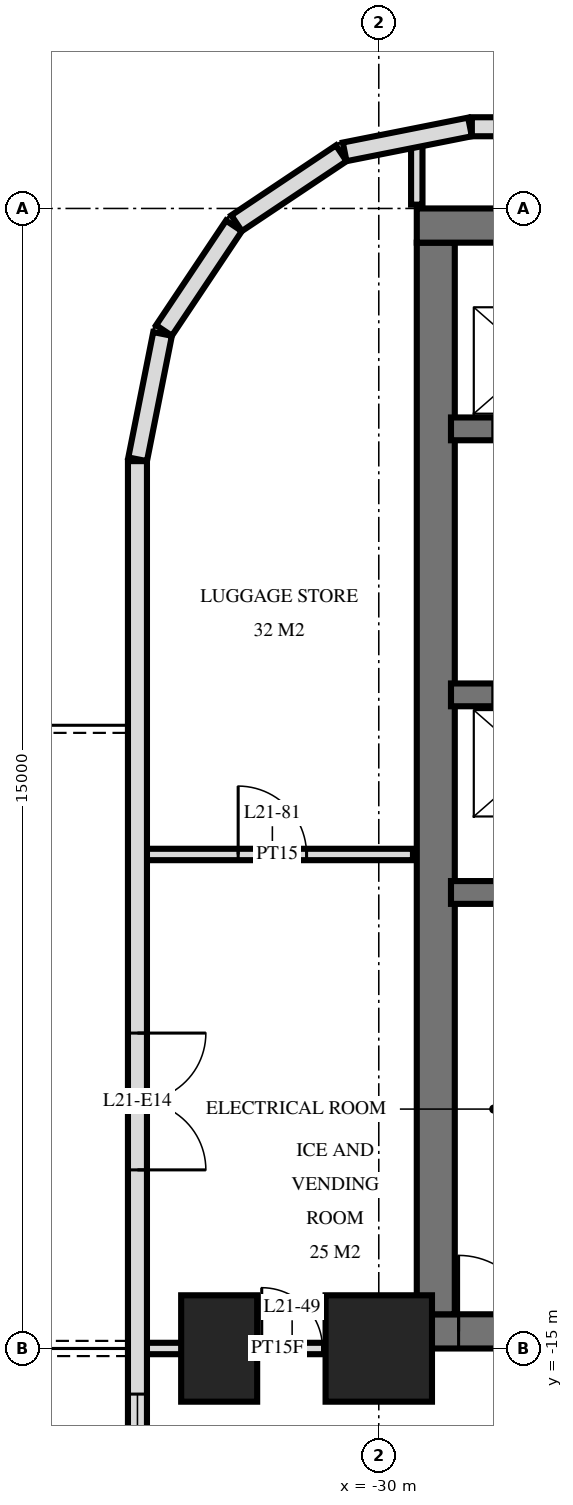
"""IFC4 building model, lengths in metres.
Left out: names, types, materials, properties, quantities, classifications, styles, units other than length and angle.
Written with IfcOpenShell. Run it as: python <this file> out.ifc"""

import sys

from ifc_helpers import new_model, si_unit, direction, frame, frame_2d, origin, origin_2d, place, context, subcontext, project, spatial, rectangle, extrude, element, fill, save


model = new_model("IFC4")
c1 = context("Model", 3, precision=1e-05, world=origin(), true_north=direction((0.0, 1.0)))
c2 = subcontext(c1, "Body", "Model", "MODEL_VIEW")
j1 = project(units=[si_unit("LENGTHUNIT", "METRE"), si_unit("PLANEANGLEUNIT", "RADIAN")], contexts=[c1])
p1 = place(None, origin())
s1 = spatial("IfcSite", under=j1, at=p1, CompositionType="ELEMENT")
p2 = place(p1, origin())
s2 = spatial("IfcBuilding", under=s1, at=p2, CompositionType="ELEMENT")
p3 = place(p2, frame((0.0, 0.0, 85.2)))
s3 = spatial("IfcBuildingStorey", under=s2, at=p3, CompositionType="ELEMENT", Elevation=85.2)
p4 = place(p3, frame((-32.1, -15.0, 0.0), z_axis=(0.0, 0.0, 1.0), x_axis=(0.0, 1.0, 0.0)))
e1 = element("IfcColumn", 1, at=p4, inside=s3, PredefinedType="COLUMN", context=c2, shape_type="SweptSolid", body=[
    extrude(rectangle(XDim=1.4, YDim=1.0, at=origin_2d()), origin(), (0.0, 0.0, 1.0), 3.6),
])
p5 = place(p3, frame((-30.0, -15.0, 0.0), z_axis=(0.0, 0.0, 1.0), x_axis=(1.0, 0.0, 0.0)))
e2 = element("IfcColumn", 2, at=p5, inside=s3, PredefinedType="COLUMN", context=c2, shape_type="SweptSolid", body=[
    extrude(rectangle(XDim=1.4, YDim=1.4, at=origin_2d()), origin(), (0.0, 0.0, 1.0), 3.6),
])
p6 = place(p3, frame((-29.5, -0.225, 0.0), z_axis=(0.0, 0.0, 1.0), x_axis=(1.0, 0.0, 0.0)))
e3 = element("IfcWall", 3, at=p6, inside=s3, PredefinedType="SHEAR", context=c2, shape_type="SweptSolid", body=[
    extrude(rectangle(XDim=19.5, YDim=0.45, at=frame_2d((9.75, 0.0))), origin(), (0.0, 0.0, 1.0), 3.6),
])
p7 = place(p3, frame((-29.5, -14.775, 0.0), z_axis=(0.0, 0.0, 1.0), x_axis=(1.0, 0.0, 0.0)))
e4 = element("IfcWall", 4, at=p7, inside=s3, PredefinedType="SHEAR", context=c2, shape_type="SweptSolid", body=[
    extrude(rectangle(XDim=19.5, YDim=0.45, at=frame_2d((9.75, 0.0))), origin(), (0.0, 0.0, 1.0), 3.6),
])
p8 = place(p7, frame((11.2, 0.0, 0.0)))
e5 = element("IfcOpeningElement", 5, at=p8, cuts=e4, PredefinedType="OPENING", context=c2, shape_type="SweptSolid", body=[
    extrude(rectangle(XDim=1.2, YDim=2.1, at=frame_2d((0.6, 1.05))), frame((0.0, 0.235, 0.0), z_axis=(0.0, -1.0, 0.0), x_axis=(1.0, 0.0, 0.0)), (0.0, 0.0, 1.0), 0.47),
])
p9 = place(p7, frame((14.25, 0.0, 0.0)))
e6 = element("IfcOpeningElement", 6, at=p9, cuts=e4, PredefinedType="OPENING", context=c2, shape_type="SweptSolid", body=[
    extrude(rectangle(XDim=1.1, YDim=2.1, at=frame_2d((0.55, 1.05))), frame((0.0, 0.235, 0.0), z_axis=(0.0, -1.0, 0.0), x_axis=(1.0, 0.0, 0.0)), (0.0, 0.0, 1.0), 0.47),
])
p10 = place(p7, frame((8.5, 0.0, 0.0)))
e7 = element("IfcOpeningElement", 7, at=p10, cuts=e4, PredefinedType="OPENING", context=c2, shape_type="SweptSolid", body=[
    extrude(rectangle(XDim=0.9, YDim=2.1, at=frame_2d((0.45, 1.05))), frame((0.0, 0.235, 0.0), z_axis=(0.0, -1.0, 0.0), x_axis=(1.0, 0.0, 0.0)), (0.0, 0.0, 1.0), 0.47),
])
p11 = place(p7, frame((6.05, 0.0, 0.0)))
e8 = element("IfcOpeningElement", 8, at=p11, cuts=e4, PredefinedType="OPENING", context=c2, shape_type="SweptSolid", body=[
    extrude(rectangle(XDim=1.0, YDim=2.1, at=frame_2d((0.5, 1.05))), frame((0.0, 0.235, 0.0), z_axis=(0.0, -1.0, 0.0), x_axis=(1.0, 0.0, 0.0)), (0.0, 0.0, 1.0), 0.47),
])
p12 = place(p7, frame((3.587, 0.0, 0.0)))
e9 = element("IfcOpeningElement", 9, at=p12, cuts=e4, PredefinedType="OPENING", context=c2, shape_type="SweptSolid", body=[
    extrude(rectangle(XDim=1.0, YDim=2.1, at=frame_2d((0.5, 1.05))), frame((0.0, 0.235, 0.0), z_axis=(0.0, -1.0, 0.0), x_axis=(1.0, 0.0, 0.0)), (0.0, 0.0, 1.0), 0.47),
])
p13 = place(p7, frame((1.85, 0.0, 0.0)))
e10 = element("IfcOpeningElement", 10, at=p13, cuts=e4, PredefinedType="OPENING", context=c2, shape_type="SweptSolid", body=[
    extrude(rectangle(XDim=1.0, YDim=2.1, at=frame_2d((0.5, 1.05))), frame((0.0, 0.235, 0.0), z_axis=(0.0, -1.0, 0.0), x_axis=(1.0, 0.0, 0.0)), (0.0, 0.0, 1.0), 0.47),
])
p14 = place(p7, frame((0.55, 0.0, 0.0)))
e11 = element("IfcOpeningElement", 11, at=p14, cuts=e4, PredefinedType="OPENING", context=c2, shape_type="SweptSolid", body=[
    extrude(rectangle(XDim=1.0, YDim=2.1, at=frame_2d((0.5, 1.05))), frame((0.0, 0.235, 0.0), z_axis=(0.0, -1.0, 0.0), x_axis=(1.0, 0.0, 0.0)), (0.0, 0.0, 1.0), 0.47),
])
p15 = place(p3, frame((-29.25, -14.55, 0.0), z_axis=(0.0, 0.0, 1.0), x_axis=(0.0, 1.0, 0.0)))
e12 = element("IfcWall", 12, at=p15, inside=s3, PredefinedType="SHEAR", context=c2, shape_type="SweptSolid", body=[
    extrude(rectangle(XDim=14.1, YDim=0.5, at=frame_2d((7.05, 0.0))), origin(), (0.0, 0.0, 1.0), 3.6),
])
p16 = place(p3, frame((-29.05, -2.9, 0.0), z_axis=(0.0, 0.0, 1.0), x_axis=(1.0, 0.0, 0.0)))
e13 = element("IfcWall", 13, at=p16, inside=s3, PredefinedType="SHEAR", context=c2, shape_type="SweptSolid", body=[
    extrude(rectangle(XDim=18.7, YDim=0.3, at=frame_2d((9.35, 0.0))), origin(), (0.0, 0.0, 1.0), 3.6),
])
p17 = place(p16, frame((2.95, 0.0, 0.0)))
e14 = element("IfcOpeningElement", 14, at=p17, cuts=e13, PredefinedType="OPENING", context=c2, shape_type="SweptSolid", body=[
    extrude(rectangle(XDim=1.1, YDim=2.1, at=frame_2d((0.55, 1.05))), frame((0.0, 0.16, 0.0), z_axis=(0.0, -1.0, 0.0), x_axis=(1.0, 0.0, 0.0)), (0.0, 0.0, 1.0), 0.32),
])
p18 = place(p16, frame((0.55, 0.0, 0.0)))
e15 = element("IfcOpeningElement", 15, at=p18, cuts=e13, PredefinedType="OPENING", context=c2, shape_type="SweptSolid", body=[
    extrude(rectangle(XDim=1.1, YDim=2.1, at=frame_2d((0.55, 1.05))), frame((0.0, 0.16, 0.0), z_axis=(0.0, -1.0, 0.0), x_axis=(1.0, 0.0, 0.0)), (0.0, 0.0, 1.0), 0.32),
])
p19 = place(p16, frame((10.9, 0.0, 0.0)))
e16 = element("IfcOpeningElement", 16, at=p19, cuts=e13, PredefinedType="OPENING", context=c2, shape_type="SweptSolid", body=[
    extrude(rectangle(XDim=0.9, YDim=2.1, at=frame_2d((0.45, 1.05))), frame((0.0, 0.16, 0.0), z_axis=(0.0, -1.0, 0.0), x_axis=(1.0, 0.0, 0.0)), (0.0, 0.0, 1.0), 0.32),
])
p20 = place(p16, frame((16.85, 0.0, 0.0)))
e17 = element("IfcOpeningElement", 17, at=p20, cuts=e13, PredefinedType="OPENING", context=c2, shape_type="SweptSolid", body=[
    extrude(rectangle(XDim=1.0, YDim=2.1, at=frame_2d((0.5, 1.05))), frame((0.0, 0.16, 0.0), z_axis=(0.0, -1.0, 0.0), x_axis=(1.0, 0.0, 0.0)), (0.0, 0.0, 1.0), 0.32),
])
p21 = place(p16, frame((14.312, 0.0, 0.0)))
e18 = element("IfcOpeningElement", 18, at=p21, cuts=e13, PredefinedType="OPENING", context=c2, shape_type="SweptSolid", body=[
    extrude(rectangle(XDim=1.0, YDim=2.1, at=frame_2d((0.5, 1.05))), frame((0.0, 0.16, 0.0), z_axis=(0.0, -1.0, 0.0), x_axis=(1.0, 0.0, 0.0)), (0.0, 0.0, 1.0), 0.32),
])
p22 = place(p16, frame((12.887, 0.0, 0.0)))
e19 = element("IfcOpeningElement", 19, at=p22, cuts=e13, PredefinedType="OPENING", context=c2, shape_type="SweptSolid", body=[
    extrude(rectangle(XDim=1.0, YDim=2.1, at=frame_2d((0.5, 1.05))), frame((0.0, 0.16, 0.0), z_axis=(0.0, -1.0, 0.0), x_axis=(1.0, 0.0, 0.0)), (0.0, 0.0, 1.0), 0.32),
])
p23 = place(p16, frame((5.6, 0.0, 0.0)))
e20 = element("IfcOpeningElement", 20, at=p23, cuts=e13, PredefinedType="OPENING", context=c2, shape_type="SweptSolid", body=[
    extrude(rectangle(XDim=1.0, YDim=2.1, at=frame_2d((0.5, 1.05))), frame((0.0, 0.16, 0.0), z_axis=(0.0, -1.0, 0.0), x_axis=(1.0, 0.0, 0.0)), (0.0, 0.0, 1.0), 0.32),
])
p24 = place(p3, frame((-29.05, -6.4, 0.0), z_axis=(0.0, 0.0, 1.0), x_axis=(1.0, 0.0, 0.0)))
e21 = element("IfcWall", 21, at=p24, inside=s3, PredefinedType="SHEAR", context=c2, shape_type="SweptSolid", body=[
    extrude(rectangle(XDim=18.7, YDim=0.3, at=frame_2d((9.35, 0.0))), origin(), (0.0, 0.0, 1.0), 3.6),
])
p25 = place(p24, frame((2.95, 0.0, 0.0)))
e22 = element("IfcOpeningElement", 22, at=p25, cuts=e21, PredefinedType="OPENING", context=c2, shape_type="SweptSolid", body=[
    extrude(rectangle(XDim=1.1, YDim=2.1, at=frame_2d((0.55, 1.05))), frame((0.0, 0.16, 0.0), z_axis=(0.0, -1.0, 0.0), x_axis=(1.0, 0.0, 0.0)), (0.0, 0.0, 1.0), 0.32),
])
p26 = place(p24, frame((0.55, 0.0, 0.0)))
e23 = element("IfcOpeningElement", 23, at=p26, cuts=e21, PredefinedType="OPENING", context=c2, shape_type="SweptSolid", body=[
    extrude(rectangle(XDim=1.1, YDim=2.1, at=frame_2d((0.55, 1.05))), frame((0.0, 0.16, 0.0), z_axis=(0.0, -1.0, 0.0), x_axis=(1.0, 0.0, 0.0)), (0.0, 0.0, 1.0), 0.32),
])
p27 = place(p24, frame((10.8, 0.0, 0.0)))
e24 = element("IfcOpeningElement", 24, at=p27, cuts=e21, PredefinedType="OPENING", context=c2, shape_type="SweptSolid", body=[
    extrude(rectangle(XDim=1.1, YDim=2.1, at=frame_2d((0.55, 1.05))), frame((0.0, 0.16, 0.0), z_axis=(0.0, -1.0, 0.0), x_axis=(1.0, 0.0, 0.0)), (0.0, 0.0, 1.0), 0.32),
])
p28 = place(p24, frame((5.6, 0.0, 0.0)))
e25 = element("IfcOpeningElement", 25, at=p28, cuts=e21, PredefinedType="OPENING", context=c2, shape_type="SweptSolid", body=[
    extrude(rectangle(XDim=1.0, YDim=2.1, at=frame_2d((0.5, 1.05))), frame((0.0, 0.16, 0.0), z_axis=(0.0, -1.0, 0.0), x_axis=(1.0, 0.0, 0.0)), (0.0, 0.0, 1.0), 0.32),
])
p29 = place(p3, frame((-29.05, -9.0, 0.0), z_axis=(0.0, 0.0, 1.0), x_axis=(1.0, 0.0, 0.0)))
e26 = element("IfcWall", 26, at=p29, inside=s3, PredefinedType="SHEAR", context=c2, shape_type="SweptSolid", body=[
    extrude(rectangle(XDim=18.7, YDim=0.3, at=frame_2d((9.35, 0.0))), origin(), (0.0, 0.0, 1.0), 3.6),
])
p30 = place(p29, frame((13.8, 0.0, 0.0)))
e27 = element("IfcOpeningElement", 27, at=p30, cuts=e26, PredefinedType="OPENING", context=c2, shape_type="SweptSolid", body=[
    extrude(rectangle(XDim=1.1, YDim=2.1, at=frame_2d((0.55, 1.05))), frame((0.0, 0.16, 0.0), z_axis=(0.0, -1.0, 0.0), x_axis=(1.0, 0.0, 0.0)), (0.0, 0.0, 1.0), 0.32),
])
p31 = place(p3, frame((28.775, 1.075, 0.0), z_axis=(0.0, 0.0, 1.0), x_axis=(-1.0, 0.0, 0.0)))
e28 = element("IfcWall", 28, at=p31, inside=s3, PredefinedType="SOLIDWALL", context=c2, shape_type="SweptSolid", body=[
    extrude(rectangle(XDim=57.551, YDim=0.25, at=frame_2d((28.775, 0.0))), origin(), (0.0, 0.0, 1.0), 3.32),
])
p32 = place(p31, frame((25.325, 0.0, 0.3)))
e29 = element("IfcOpeningElement", 29, at=p32, cuts=e28, PredefinedType="OPENING", context=c2, shape_type="SweptSolid", body=[
    extrude(rectangle(XDim=2.4, YDim=2.1, at=frame_2d((1.2, 1.05))), frame((0.0, 0.135, 0.0), z_axis=(0.0, -1.0, 0.0), x_axis=(1.0, 0.0, 0.0)), (0.0, 0.0, 1.0), 0.27),
])
p33 = place(p31, frame((30.275, 0.0, 0.3)))
e30 = element("IfcOpeningElement", 30, at=p33, cuts=e28, PredefinedType="OPENING", context=c2, shape_type="SweptSolid", body=[
    extrude(rectangle(XDim=2.4, YDim=2.1, at=frame_2d((1.2, 1.05))), frame((0.0, 0.135, 0.0), z_axis=(0.0, -1.0, 0.0), x_axis=(1.0, 0.0, 0.0)), (0.0, 0.0, 1.0), 0.27),
])
p34 = place(p31, frame((34.825, 0.0, 0.3)))
e31 = element("IfcOpeningElement", 31, at=p34, cuts=e28, PredefinedType="OPENING", context=c2, shape_type="SweptSolid", body=[
    extrude(rectangle(XDim=2.4, YDim=2.1, at=frame_2d((1.2, 1.05))), frame((0.0, 0.135, 0.0), z_axis=(0.0, -1.0, 0.0), x_axis=(1.0, 0.0, 0.0)), (0.0, 0.0, 1.0), 0.27),
])
p35 = place(p3, frame((-28.8, 1.073, 0.0), z_axis=(0.0, 0.0, 1.0), x_axis=(-0.980803419081, -0.194999110559, 0.0)))
e32 = element("IfcWall", 32, at=p35, inside=s3, PredefinedType="SOLIDWALL", context=c2, shape_type="SweptSolid", body=[
    extrude(rectangle(XDim=1.681, YDim=0.25, at=frame_2d((0.841, 0.0))), origin(), (0.0, 0.0, 1.0), 3.32),
])
for number, where, z_axis, x_axis in (
    (33, (-30.494, 0.726, 0.0), (0.0, 0.0, 1.0), (-0.831, -0.556, 0.0)),
    (34, (-31.906, -0.229, 0.0), (0.0, 0.0, 1.0), (-0.556, -0.831, 0.0)),
):
    element("IfcWall", number, at=place(p3, frame(where, z_axis=z_axis, x_axis=x_axis)), inside=s3, PredefinedType="SOLIDWALL", context=c2, shape_type="SweptSolid", body=[
        extrude(rectangle(XDim=1.656, YDim=0.25, at=frame_2d((0.828, 0.0))), origin(), (0.0, 0.0, 1.0), 3.32),
    ])
p36 = place(p3, frame((-32.844, -1.651, 0.0), z_axis=(0.0, 0.0, 1.0), x_axis=(-0.19513878023, -0.980775640221, 0.0)))
e35 = element("IfcWall", 35, at=p36, inside=s3, PredefinedType="SOLIDWALL", context=c2, shape_type="SweptSolid", body=[
    extrude(rectangle(XDim=1.681, YDim=0.25, at=frame_2d((0.841, 0.0))), origin(), (0.0, 0.0, 1.0), 3.32),
])
p37 = place(p3, frame((-33.175, -3.325, 0.0), z_axis=(0.0, 0.0, 1.0), x_axis=(0.0, -1.0, 0.0)))
e36 = element("IfcWall", 36, at=p37, inside=s3, PredefinedType="SOLIDWALL", context=c2, shape_type="SweptSolid", body=[
    extrude(rectangle(XDim=21.551, YDim=0.25, at=frame_2d((10.775, 0.0))), origin(), (0.0, 0.0, 1.0), 3.32),
])
p38 = place(p37, frame((7.525, 0.0, 0.0)))
e37 = element("IfcOpeningElement", 37, at=p38, cuts=e36, PredefinedType="OPENING", context=c2, shape_type="SweptSolid", body=[
    extrude(rectangle(XDim=1.8, YDim=2.4, at=frame_2d((0.9, 1.2))), frame((0.0, 0.135, 0.0), z_axis=(0.0, -1.0, 0.0), x_axis=(1.0, 0.0, 0.0)), (0.0, 0.0, 1.0), 0.27),
])
p39 = place(p37, frame((12.275, 0.0, 0.3)))
e38 = element("IfcOpeningElement", 38, at=p39, cuts=e36, PredefinedType="OPENING", context=c2, shape_type="SweptSolid", body=[
    extrude(rectangle(XDim=1.2, YDim=2.1, at=frame_2d((0.6, 1.05))), frame((0.0, 0.135, 0.0), z_axis=(0.0, -1.0, 0.0), x_axis=(1.0, 0.0, 0.0)), (0.0, 0.0, 1.0), 0.27),
])
p40 = place(p37, frame((15.275, 0.0, 0.0)))
e39 = element("IfcOpeningElement", 39, at=p40, cuts=e36, PredefinedType="OPENING", context=c2, shape_type="SweptSolid", body=[
    extrude(rectangle(XDim=1.8, YDim=2.4, at=frame_2d((0.9, 1.2))), frame((0.0, 0.135, 0.0), z_axis=(0.0, -1.0, 0.0), x_axis=(1.0, 0.0, 0.0)), (0.0, 0.0, 1.0), 0.27),
])
p41 = place(p37, frame((18.875, 0.0, 0.0)))
e40 = element("IfcOpeningElement", 40, at=p41, cuts=e36, PredefinedType="OPENING", context=c2, shape_type="SweptSolid", body=[
    extrude(rectangle(XDim=1.8, YDim=2.4, at=frame_2d((0.9, 1.2))), frame((0.0, 0.135, 0.0), z_axis=(0.0, -1.0, 0.0), x_axis=(1.0, 0.0, 0.0)), (0.0, 0.0, 1.0), 0.27),
])
p42 = place(p3, frame((-29.5, 0.05, 0.0), z_axis=(0.0, 0.0, 1.0), x_axis=(0.0, 1.0, 0.0)))
e41 = element("IfcWall", 41, at=p42, inside=s3, PredefinedType="PARTITIONING", context=c2, shape_type="SweptSolid", body=[
    extrude(rectangle(XDim=0.827, YDim=0.15, at=frame_2d((0.414, 0.0))), origin(), (0.0, 0.0, 1.0), 3.32),
])
p43 = place(p3, frame((-33.12, -15.0, 0.0), z_axis=(0.0, 0.0, 1.0), x_axis=(1.0, 0.0, 0.0)))
e42 = element("IfcWall", 42, at=p43, inside=s3, PredefinedType="PARTITIONING", context=c2, shape_type="SweptSolid", body=[
    extrude(rectangle(XDim=3.57, YDim=0.15, at=frame_2d((1.785, 0.0))), origin(), (0.0, 0.0, 1.0), 3.32),
])
p44 = place(p43, frame((1.58, 0.0, 0.0)))
e43 = element("IfcOpeningElement", 43, at=p44, cuts=e42, PredefinedType="OPENING", context=c2, shape_type="SweptSolid", body=[
    extrude(rectangle(XDim=0.8, YDim=2.1, at=frame_2d((0.4, 1.05))), frame((0.0, 0.085, 0.0), z_axis=(0.0, -1.0, 0.0), x_axis=(1.0, 0.0, 0.0)), (0.0, 0.0, 1.0), 0.17),
])
p45 = place(p3, frame((-33.12, -8.5, 0.0), z_axis=(0.0, 0.0, 1.0), x_axis=(1.0, 0.0, 0.0)))
e44 = element("IfcWall", 44, at=p45, inside=s3, PredefinedType="PARTITIONING", context=c2, shape_type="SweptSolid", body=[
    extrude(rectangle(XDim=3.57, YDim=0.15, at=frame_2d((1.785, 0.0))), origin(), (0.0, 0.0, 1.0), 3.32),
])
p46 = place(p45, frame((1.27, 0.0, 0.0)))
e45 = element("IfcOpeningElement", 45, at=p46, cuts=e44, PredefinedType="OPENING", context=c2, shape_type="SweptSolid", body=[
    extrude(rectangle(XDim=0.9, YDim=2.1, at=frame_2d((0.45, 1.05))), frame((0.0, 0.085, 0.0), z_axis=(0.0, -1.0, 0.0), x_axis=(1.0, 0.0, 0.0)), (0.0, 0.0, 1.0), 0.17),
])
p47 = place(p38, origin())
e46 = element("IfcDoor", 46, at=p47, inside=s3, OperationType="DOUBLE_DOOR_SINGLE_SWING", PredefinedType="DOOR", context=c2, shape_type="SweptSolid", body=[
    extrude(rectangle(XDim=1.8, YDim=2.4, at=frame_2d((0.9, 1.2))), frame((0.0, 0.025, 0.0), z_axis=(0.0, -1.0, 0.0), x_axis=(1.0, 0.0, 0.0)), (0.0, 0.0, 1.0), 0.05),
])
fill(e37, e46)
p48 = place(p39, origin())
e47 = element("IfcWindow", 47, at=p48, inside=s3, PartitioningType="SINGLE_PANEL", PredefinedType="WINDOW", context=c2, shape_type="SweptSolid", body=[
    extrude(rectangle(XDim=1.2, YDim=2.1, at=frame_2d((0.6, 1.05))), frame((0.0, 0.03, 0.0), z_axis=(0.0, -1.0, 0.0), x_axis=(1.0, 0.0, 0.0)), (0.0, 0.0, 1.0), 0.06),
])
fill(e38, e47)
p49 = place(p14, origin())
e48 = element("IfcDoor", 48, at=p49, inside=s3, OperationType="SINGLE_SWING_RIGHT", PredefinedType="DOOR", context=c2, shape_type="SweptSolid", body=[
    extrude(rectangle(XDim=1.0, YDim=2.1, at=frame_2d((0.5, 1.05))), frame((0.0, 0.025, 0.0), z_axis=(0.0, -1.0, 0.0), x_axis=(1.0, 0.0, 0.0)), (0.0, 0.0, 1.0), 0.05),
])
fill(e11, e48)
p50 = place(p44, origin())
e49 = element("IfcDoor", 49, at=p50, inside=s3, OperationType="SINGLE_SWING_RIGHT", PredefinedType="DOOR", context=c2, shape_type="SweptSolid", body=[
    extrude(rectangle(XDim=0.8, YDim=2.1, at=frame_2d((0.4, 1.05))), frame((0.0, 0.025, 0.0), z_axis=(0.0, -1.0, 0.0), x_axis=(1.0, 0.0, 0.0)), (0.0, 0.0, 1.0), 0.05),
])
fill(e43, e49)
p51 = place(p46, origin())
e50 = element("IfcDoor", 50, at=p51, inside=s3, OperationType="SINGLE_SWING_RIGHT", PredefinedType="DOOR", context=c2, shape_type="SweptSolid", body=[
    extrude(rectangle(XDim=0.9, YDim=2.1, at=frame_2d((0.45, 1.05))), frame((0.0, 0.025, 0.0), z_axis=(0.0, -1.0, 0.0), x_axis=(1.0, 0.0, 0.0)), (0.0, 0.0, 1.0), 0.05),
])
fill(e45, e50)
save(model, sys.argv[1])
